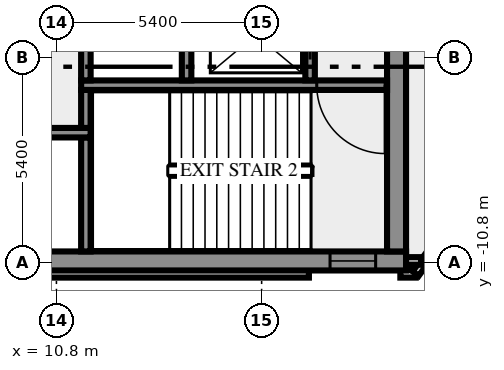
"""IFC4 building model, lengths in metres.
Left out: names, types, materials, properties, quantities, classifications, styles, units other than length and angle.
Written with IfcOpenShell. Run it as: python <this file> out.ifc"""

import sys

from ifc_helpers import new_model, si_unit, direction, frame, frame_2d, origin, place, context, subcontext, project, spatial, rectangle, extrude, element, fill, save


model = new_model("IFC4")
c1 = context("Model", 3, precision=1e-05, world=origin(), true_north=direction((0.0, 1.0)))
c2 = subcontext(c1, "Body", "Model", "MODEL_VIEW")
j1 = project(units=[si_unit("LENGTHUNIT", "METRE"), si_unit("PLANEANGLEUNIT", "RADIAN")], contexts=[c1])
p1 = place(None, origin())
s1 = spatial("IfcSite", under=j1, at=p1, CompositionType="ELEMENT")
p2 = place(p1, origin())
s2 = spatial("IfcBuilding", under=s1, at=p2, CompositionType="ELEMENT")
p3 = place(p2, frame((0.0, 0.0, 75.0)))
s3 = spatial("IfcBuildingStorey", under=s2, at=p3, CompositionType="ELEMENT", Elevation=75.0)
p4 = place(p3, frame((-17.444, -11.088, 0.0), z_axis=(0.0, 0.0, 1.0), x_axis=(1.0, 0.0, 0.0)))
e1 = element("IfcWall", 1, at=p4, inside=s3, PredefinedType="SOLIDWALL", context=c2, shape_type="SweptSolid", body=[
    extrude(rectangle(XDim=34.888, YDim=0.2, at=frame_2d((17.444, 0.0))), origin(), (0.0, 0.0, 1.0), 3.4),
])
p5 = place(p3, frame((19.85, -11.088, 0.0), z_axis=(0.0, 0.0, 1.0), x_axis=(1.0, 0.0, 0.0)))
e2 = element("IfcWall", 2, at=p5, inside=s3, PredefinedType="SOLIDWALL", context=c2, shape_type="SweptSolid", body=[
    extrude(rectangle(XDim=0.406, YDim=0.2, at=frame_2d((0.203, 0.0))), origin(), (0.0, 0.0, 1.0), 3.4),
])
p6 = place(p3, frame((20.253, -11.083, 0.0), z_axis=(0.0, 0.0, 1.0), x_axis=(0.587766567315, 0.809030569476, 0.0)))
e3 = element("IfcWall", 3, at=p6, inside=s3, PredefinedType="SOLIDWALL", context=c2, shape_type="SweptSolid", body=[
    extrude(rectangle(XDim=2.688, YDim=0.2, at=frame_2d((1.344, 0.0))), origin(), (0.0, 0.0, 1.0), 3.4),
])
p7 = place(p3, frame((19.98, -10.75, 0.0), z_axis=(0.0, 0.0, 1.0), x_axis=(1.0, 0.0, 0.0)))
e4 = element("IfcWall", 4, at=p7, inside=s3, PredefinedType="SOLIDWALL", context=c2, shape_type="SweptSolid", body=[
    extrude(rectangle(XDim=0.417, YDim=0.2, at=frame_2d((0.208, 0.0))), origin(), (0.0, 0.0, 1.0), 3.4),
])
p8 = place(p3, frame((-20.0, -10.75, 0.0), z_axis=(0.0, 0.0, 1.0), x_axis=(1.0, 0.0, 0.0)))
e5 = element("IfcWall", 5, at=p8, inside=s3, PredefinedType="SHEAR", context=c2, shape_type="SweptSolid", body=[
    extrude(rectangle(XDim=40.0, YDim=0.5, at=frame_2d((20.0, 0.0))), origin(), (0.0, 0.0, 1.0), 3.4),
])
p9 = place(p8, frame((0.8, 0.0, 1.0)))
e6 = element("IfcOpeningElement", 6, at=p9, cuts=e5, PredefinedType="OPENING", context=c2, shape_type="SweptSolid", body=[
    extrude(rectangle(XDim=1.2, YDim=1.2, at=frame_2d((0.6, 0.6))), frame((0.0, 0.26, 0.0), z_axis=(0.0, -1.0, 0.0), x_axis=(1.0, 0.0, 0.0)), (0.0, 0.0, 1.0), 0.52),
])
p10 = place(p8, frame((38.0, 0.0, 1.0)))
e7 = element("IfcOpeningElement", 7, at=p10, cuts=e5, PredefinedType="OPENING", context=c2, shape_type="SweptSolid", body=[
    extrude(rectangle(XDim=1.2, YDim=1.2, at=frame_2d((0.6, 0.6))), frame((0.0, 0.26, 0.0), z_axis=(0.0, -1.0, 0.0), x_axis=(1.0, 0.0, 0.0)), (0.0, 0.0, 1.0), 0.52),
])
p11 = place(p3, frame((11.575, -10.5, 0.0), z_axis=(0.0, 0.0, 1.0), x_axis=(0.0, 1.0, 0.0)))
e8 = element("IfcWall", 8, at=p11, inside=s3, PredefinedType="SHEAR", context=c2, shape_type="SweptSolid", body=[
    extrude(rectangle(XDim=3.0, YDim=0.25, at=frame_2d((1.5, 0.0))), origin(), (0.0, 0.0, 1.0), 3.4),
])
p12 = place(p3, frame((19.75, -10.5, 0.0), z_axis=(0.0, 0.0, 1.0), x_axis=(0.0, 1.0, 0.0)))
e9 = element("IfcWall", 9, at=p12, inside=s3, PredefinedType="SHEAR", context=c2, shape_type="SweptSolid", body=[
    extrude(rectangle(XDim=8.8, YDim=0.5, at=frame_2d((4.4, 0.0))), origin(), (0.0, 0.0, 1.0), 3.4),
])
p13 = place(p3, frame((11.7, -7.375, 0.0), z_axis=(0.0, 0.0, 1.0), x_axis=(-1.0, 0.0, 0.0)))
e10 = element("IfcWall", 10, at=p13, inside=s3, PredefinedType="SHEAR", context=c2, shape_type="SweptSolid", body=[
    extrude(rectangle(XDim=23.4, YDim=0.25, at=frame_2d((11.7, 0.0))), origin(), (0.0, 0.0, 1.0), 3.4),
])
p14 = place(p13, frame((21.45, 0.0, 0.0)))
e11 = element("IfcOpeningElement", 11, at=p14, cuts=e10, PredefinedType="OPENING", context=c2, shape_type="SweptSolid", body=[
    extrude(rectangle(XDim=1.1, YDim=2.1, at=frame_2d((0.55, 1.05))), frame((0.0, 0.135, 0.0), z_axis=(0.0, -1.0, 0.0), x_axis=(1.0, 0.0, 0.0)), (0.0, 0.0, 1.0), 0.27),
])
p15 = place(p13, frame((18.95, 0.0, 0.0)))
e12 = element("IfcOpeningElement", 12, at=p15, cuts=e10, PredefinedType="OPENING", context=c2, shape_type="SweptSolid", body=[
    extrude(rectangle(XDim=1.1, YDim=2.1, at=frame_2d((0.55, 1.05))), frame((0.0, 0.135, 0.0), z_axis=(0.0, -1.0, 0.0), x_axis=(1.0, 0.0, 0.0)), (0.0, 0.0, 1.0), 0.27),
])
p16 = place(p13, frame((16.45, 0.0, 0.0)))
e13 = element("IfcOpeningElement", 13, at=p16, cuts=e10, PredefinedType="OPENING", context=c2, shape_type="SweptSolid", body=[
    extrude(rectangle(XDim=1.1, YDim=2.1, at=frame_2d((0.55, 1.05))), frame((0.0, 0.135, 0.0), z_axis=(0.0, -1.0, 0.0), x_axis=(1.0, 0.0, 0.0)), (0.0, 0.0, 1.0), 0.27),
])
p17 = place(p13, frame((14.65, 0.0, 0.0)))
e14 = element("IfcOpeningElement", 14, at=p17, cuts=e10, PredefinedType="OPENING", context=c2, shape_type="SweptSolid", body=[
    extrude(rectangle(XDim=0.8, YDim=2.1, at=frame_2d((0.4, 1.05))), frame((0.0, 0.135, 0.0), z_axis=(0.0, -1.0, 0.0), x_axis=(1.0, 0.0, 0.0)), (0.0, 0.0, 1.0), 0.27),
])
p18 = place(p13, frame((12.8, 0.0, 0.0)))
e15 = element("IfcOpeningElement", 15, at=p18, cuts=e10, PredefinedType="OPENING", context=c2, shape_type="SweptSolid", body=[
    extrude(rectangle(XDim=0.9, YDim=2.1, at=frame_2d((0.45, 1.05))), frame((0.0, 0.135, 0.0), z_axis=(0.0, -1.0, 0.0), x_axis=(1.0, 0.0, 0.0)), (0.0, 0.0, 1.0), 0.27),
])
p19 = place(p13, frame((10.7, 0.0, 0.0)))
e16 = element("IfcOpeningElement", 16, at=p19, cuts=e10, PredefinedType="OPENING", context=c2, shape_type="SweptSolid", body=[
    extrude(rectangle(XDim=0.9, YDim=2.1, at=frame_2d((0.45, 1.05))), frame((0.0, 0.135, 0.0), z_axis=(0.0, -1.0, 0.0), x_axis=(1.0, 0.0, 0.0)), (0.0, 0.0, 1.0), 0.27),
])
p20 = place(p3, frame((11.575, -7.25, 0.0), z_axis=(0.0, 0.0, 1.0), x_axis=(0.0, 1.0, 0.0)))
e17 = element("IfcWall", 17, at=p20, inside=s3, PredefinedType="SHEAR", context=c2, shape_type="SweptSolid", body=[
    extrude(rectangle(XDim=1.0, YDim=0.25, at=frame_2d((0.5, 0.0))), origin(), (0.0, 0.0, 1.0), 3.4),
])
p21 = place(p3, frame((19.5, -6.125, 0.0), z_axis=(0.0, 0.0, 1.0), x_axis=(-1.0, 0.0, 0.0)))
e18 = element("IfcWall", 18, at=p21, inside=s3, PredefinedType="SHEAR", context=c2, shape_type="SweptSolid", body=[
    extrude(rectangle(XDim=8.05, YDim=0.25, at=frame_2d((4.025, 0.0))), origin(), (0.0, 0.0, 1.0), 3.4),
])
p22 = place(p21, frame((0.05, 0.0, 0.0)))
e19 = element("IfcOpeningElement", 19, at=p22, cuts=e18, PredefinedType="OPENING", context=c2, shape_type="SweptSolid", body=[
    extrude(rectangle(XDim=1.8, YDim=2.1, at=frame_2d((0.9, 1.05))), frame((0.0, 0.135, 0.0), z_axis=(0.0, -1.0, 0.0), x_axis=(1.0, 0.0, 0.0)), (0.0, 0.0, 1.0), 0.27),
])
for number, where, z_axis, x_axis in (
    (20, (11.575, -6.0, 0.0), (0.0, 0.0, 1.0), (0.0, 1.0, 0.0)),
    (21, (14.225, -6.0, 0.0), (0.0, 0.0, 1.0), (0.0, 1.0, 0.0)),
):
    element("IfcWall", number, at=place(p3, frame(where, z_axis=z_axis, x_axis=x_axis)), inside=s3, PredefinedType="SHEAR", context=c2, shape_type="SweptSolid", body=[
        extrude(rectangle(XDim=1.75, YDim=0.25, at=frame_2d((0.875, 0.0))), origin(), (0.0, 0.0, 1.0), 3.4),
    ])
p23 = place(p3, frame((17.475, -6.0, 0.0), z_axis=(0.0, 0.0, 1.0), x_axis=(0.0, 1.0, 0.0)))
e22 = element("IfcWall", 22, at=p23, inside=s3, PredefinedType="SHEAR", context=c2, shape_type="SweptSolid", body=[
    extrude(rectangle(XDim=4.3, YDim=0.25, at=frame_2d((2.15, 0.0))), origin(), (0.0, 0.0, 1.0), 3.4),
])
p24 = place(p23, frame((0.55, 0.0, 0.0)))
e23 = element("IfcOpeningElement", 23, at=p24, cuts=e22, PredefinedType="OPENING", context=c2, shape_type="SweptSolid", body=[
    extrude(rectangle(XDim=1.3, YDim=2.1, at=frame_2d((0.65, 1.05))), frame((0.0, 0.135, 0.0), z_axis=(0.0, -1.0, 0.0), x_axis=(1.0, 0.0, 0.0)), (0.0, 0.0, 1.0), 0.27),
])
p25 = place(p10, origin())
e24 = element("IfcWindow", 24, at=p25, inside=s3, PartitioningType="SINGLE_PANEL", PredefinedType="WINDOW", context=c2, shape_type="SweptSolid", body=[
    extrude(rectangle(XDim=1.2, YDim=1.2, at=frame_2d((0.6, 0.6))), frame((0.0, 0.03, 0.0), z_axis=(0.0, -1.0, 0.0), x_axis=(1.0, 0.0, 0.0)), (0.0, 0.0, 1.0), 0.06),
])
fill(e7, e24)
p26 = place(p22, origin())
e25 = element("IfcDoor", 25, at=p26, inside=s3, OperationType="DOUBLE_DOOR_SINGLE_SWING", PredefinedType="DOOR", context=c2, shape_type="SweptSolid", body=[
    extrude(rectangle(XDim=1.8, YDim=2.1, at=frame_2d((0.9, 1.05))), frame((0.0, 0.025, 0.0), z_axis=(0.0, -1.0, 0.0), x_axis=(1.0, 0.0, 0.0)), (0.0, 0.0, 1.0), 0.05),
])
fill(e19, e25)
p27 = place(p24, origin())
e26 = element("IfcDoor", 26, at=p27, inside=s3, OperationType="DOUBLE_DOOR_SLIDING", PredefinedType="DOOR", context=c2, shape_type="SweptSolid", body=[
    extrude(rectangle(XDim=1.3, YDim=2.1, at=frame_2d((0.65, 1.05))), frame((0.0, 0.025, 0.0), z_axis=(0.0, -1.0, 0.0), x_axis=(1.0, 0.0, 0.0)), (0.0, 0.0, 1.0), 0.05),
])
fill(e23, e26)
save(model, sys.argv[1])
